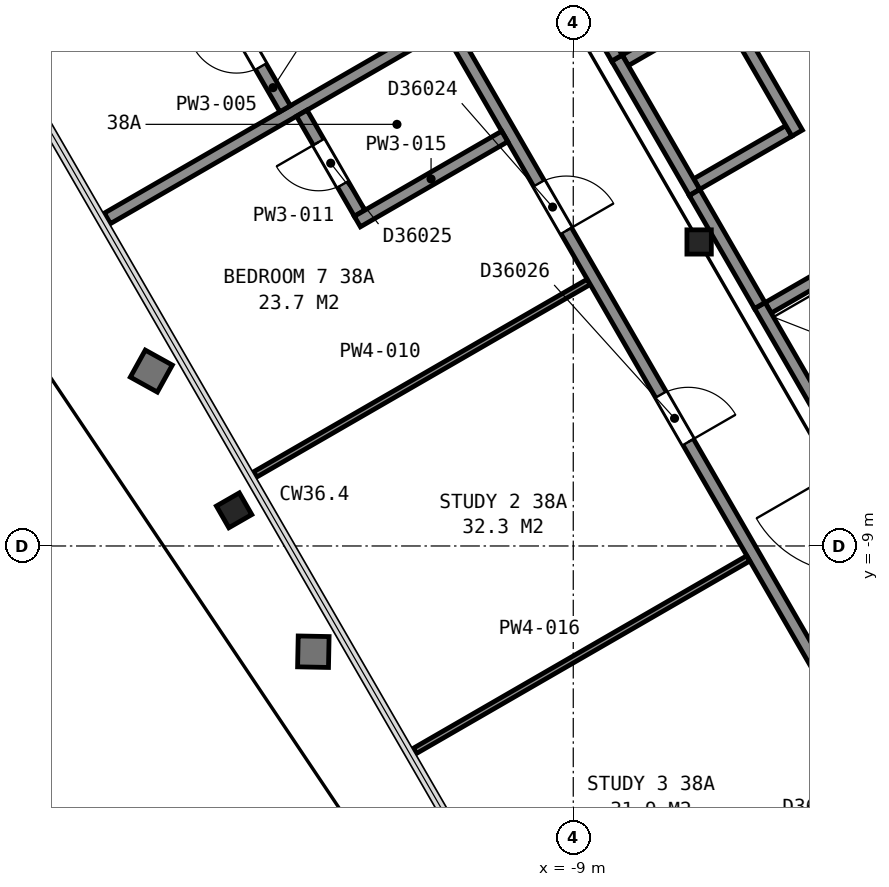
"""IFC4 building model, lengths in metres.
Left out: names, types, materials, properties, quantities, classifications, styles, units other than length and angle.
Written with IfcOpenShell. Run it as: python <this file> out.ifc"""

import sys

from ifc_helpers import new_model, si_unit, direction, frame, frame_2d, origin, origin_2d, place, context, subcontext, project, spatial, rectangle, i_section, extrude, element, fill, save


model = new_model("IFC4")
c1 = context("Model", 3, precision=1e-05, world=origin(), true_north=direction((0.0, 1.0)))
c2 = subcontext(c1, "Body", "Model", "MODEL_VIEW")
j1 = project(units=[si_unit("LENGTHUNIT", "METRE"), si_unit("PLANEANGLEUNIT", "RADIAN")], contexts=[c1])
p1 = place(None, origin())
s1 = spatial("IfcSite", under=j1, at=p1, CompositionType="ELEMENT")
p2 = place(p1, origin())
s2 = spatial("IfcBuilding", under=s1, at=p2, CompositionType="ELEMENT")
p3 = place(p2, frame((0.0, 0.0, 156.2)))
s3 = spatial("IfcBuildingStorey", under=s2, at=p3, CompositionType="ELEMENT", Elevation=156.2)
p4 = place(p3, frame((-14.386, -8.303, 0.035), z_axis=(-0.161950913523, -0.092968149868, 0.982409703087), x_axis=(-0.500182531239, 0.865919842872, -0.000511041508)))
e1 = element("IfcColumn", 1, at=p4, inside=s3, PredefinedType="COLUMN", context=c2, shape_type="SweptSolid", body=[
    extrude(i_section(OverallWidth=0.411, OverallDepth=0.434, WebThickness=0.036, FlangeThickness=0.057, FilletRadius=0.015, at=origin_2d()), origin(), (0.0, 0.0, 1.0), 3.695),
])
p5 = place(p3, frame((-6.93, -4.0, 0.0), z_axis=(0.0, 0.0, 1.0), x_axis=(1.0, 0.0, 0.0)))
e2 = element("IfcColumn", 2, at=p5, inside=s3, PredefinedType="COLUMN", context=c2, shape_type="SweptSolid", body=[
    extrude(i_section(OverallWidth=0.401, OverallDepth=0.399, WebThickness=0.025, FlangeThickness=0.04, FilletRadius=0.015, at=origin_2d()), origin(), (0.0, 0.0, 1.0), 3.7),
])
for number, where, z_axis, x_axis in (
    (3, (-5.795, -5.083, 0.0), (0.0, 0.0, 1.0), (0.866, 0.5, 0.0)),
    (4, (-6.97, -3.048, 0.0), (0.0, 0.0, 1.0), (0.866, 0.5, 0.0)),
):
    element("IfcWall", number, at=place(p3, frame(where, z_axis=z_axis, x_axis=x_axis)), inside=s3, PredefinedType="PARTITIONING", context=c2, shape_type="SweptSolid", body=[
        extrude(rectangle(XDim=1.75, YDim=0.2, at=frame_2d((0.875, 0.0))), origin(), (0.0, 0.0, 1.0), 3.7),
    ])
p6 = place(p3, frame((-8.145, -1.013, 0.0), z_axis=(0.0, 0.0, 1.0), x_axis=(0.866016494683, 0.500015430699, 0.0)))
e5 = element("IfcWall", 5, at=p6, inside=s3, PredefinedType="PARTITIONING", context=c2, shape_type="SweptSolid", body=[
    extrude(rectangle(XDim=3.15, YDim=0.2, at=frame_2d((1.575, 0.0))), origin(), (0.0, 0.0, 1.0), 3.7),
])
p7 = place(p3, frame((-5.318, -2.21, 0.0), z_axis=(0.0, 0.0, 1.0), x_axis=(-0.499938297808, 0.866061024631, 0.0)))
e6 = element("IfcWall", 6, at=p7, inside=s3, PredefinedType="PARTITIONING", context=c2, shape_type="SweptSolid", body=[
    extrude(rectangle(XDim=2.35, YDim=0.2, at=frame_2d((1.175, 0.0))), origin(), (0.0, 0.0, 1.0), 3.7),
])
for number, where, z_axis, x_axis in (
    (7, (-4.656, -7.255, 0.0), (0.0, 0.0, 1.0), (-0.5, 0.866, 0.0)),
    (8, (-7.006, -3.185, 0.0), (0.0, 0.0, 1.0), (-0.5, 0.866, 0.0)),
):
    element("IfcWall", number, at=place(p3, frame(where, z_axis=z_axis, x_axis=x_axis)), inside=s3, PredefinedType="PARTITIONING", context=c2, shape_type="SweptSolid", body=[
        extrude(rectangle(XDim=2.55, YDim=0.2, at=frame_2d((1.275, 0.0))), origin(), (0.0, 0.0, 1.0), 3.7),
    ])
p8 = place(p3, frame((-11.591, 4.755, 0.0), z_axis=(0.0, 0.0, 1.0), x_axis=(0.500043977787, -0.866000011708, 0.0)))
e9 = element("IfcWall", 9, at=p8, inside=s3, PredefinedType="PARTITIONING", context=c2, shape_type="SweptSolid", body=[
    extrude(rectangle(XDim=6.617, YDim=0.2, at=frame_2d((3.308, 0.0))), origin(), (0.0, 0.0, 1.0), 3.45),
])
p9 = place(p8, frame((3.695, 0.0, 0.0)))
e10 = element("IfcOpeningElement", 10, at=p9, cuts=e9, PredefinedType="OPENING", context=c2, shape_type="SweptSolid", body=[
    extrude(rectangle(XDim=1.8, YDim=2.1, at=frame_2d((0.9, 1.05))), frame((0.0, 0.11, 0.0), z_axis=(0.0, -1.0, 0.0), x_axis=(1.0, 0.0, 0.0)), (0.0, 0.0, 1.0), 0.22),
])
p10 = place(p3, frame((-7.005, -3.187, 0.0), z_axis=(0.0, 0.0, 1.0), x_axis=(0.499689606989, -0.866204535123, 0.0)))
e11 = element("IfcWall", 11, at=p10, inside=s3, PredefinedType="PARTITIONING", context=c2, shape_type="SweptSolid", body=[
    extrude(rectangle(XDim=2.145, YDim=0.2, at=frame_2d((1.072, 0.0))), origin(), (0.0, 0.0, 1.0), 3.45),
])
p11 = place(p3, frame((-16.662, -3.612, 0.0), z_axis=(0.0, 0.0, 1.0), x_axis=(0.866030886774, 0.499990503064, 0.0)))
e12 = element("IfcWall", 12, at=p11, inside=s3, PredefinedType="PARTITIONING", context=c2, shape_type="SweptSolid", body=[
    extrude(rectangle(XDim=6.333, YDim=0.2, at=frame_2d((3.167, 0.0))), origin(), (0.0, 0.0, 1.0), 2.713),
])
p12 = place(p3, frame((-14.938, 0.271, 0.0), z_axis=(0.0, 0.0, 1.0), x_axis=(0.499913221443, -0.866075499611, 0.0)))
e13 = element("IfcWall", 13, at=p12, inside=s3, PredefinedType="PARTITIONING", context=c2, shape_type="SweptSolid", body=[
    extrude(rectangle(XDim=2.4, YDim=0.2, at=frame_2d((1.2, 0.0))), origin(), (0.0, 0.0, 1.0), 2.713),
])
p13 = place(p12, frame((0.8, 0.0, 0.0)))
e14 = element("IfcOpeningElement", 14, at=p13, cuts=e13, PredefinedType="OPENING", context=c2, shape_type="SweptSolid", body=[
    extrude(rectangle(XDim=0.8, YDim=2.1, at=frame_2d((0.4, 1.05))), frame((0.0, 0.11, 0.0), z_axis=(0.0, -1.0, 0.0), x_axis=(1.0, 0.0, 0.0)), (0.0, 0.0, 1.0), 0.22),
])
p14 = place(p3, frame((-14.23, -7.823, 0.0), z_axis=(0.0, 0.0, 1.0), x_axis=(0.866021249958, 0.50000719457, 0.0)))
e15 = element("IfcWall", 15, at=p14, inside=s3, PredefinedType="PARTITIONING", context=c2, shape_type="SweptSolid", body=[
    extrude(rectangle(XDim=6.333, YDim=0.1, at=frame_2d((3.167, 0.0))), origin(), (0.0, 0.0, 1.0), 2.713),
])
p15 = place(p3, frame((-13.464, -1.882, 0.0), z_axis=(0.0, 0.0, 1.0), x_axis=(0.500007885066, -0.866020851292, 0.0)))
e16 = element("IfcWall", 16, at=p15, inside=s3, PredefinedType="PARTITIONING", context=c2, shape_type="SweptSolid", body=[
    extrude(rectangle(XDim=1.9, YDim=0.2, at=frame_2d((0.95, 0.0))), origin(), (0.0, 0.0, 1.0), 2.713),
])
p16 = place(p15, frame((0.55, 0.0, 0.0)))
e17 = element("IfcOpeningElement", 17, at=p16, cuts=e16, PredefinedType="OPENING", context=c2, shape_type="SweptSolid", body=[
    extrude(rectangle(XDim=0.8, YDim=2.1, at=frame_2d((0.4, 1.05))), frame((0.0, 0.11, 0.0), z_axis=(0.0, -1.0, 0.0), x_axis=(1.0, 0.0, 0.0)), (0.0, 0.0, 1.0), 0.22),
])
p17 = place(p3, frame((-4.075, -12.545, 0.0), z_axis=(0.0, 0.0, 1.0), x_axis=(-0.499999743747, 0.866025551732, 0.0)))
e18 = element("IfcWall", 18, at=p17, inside=s3, PredefinedType="PARTITIONING", context=c2, shape_type="SweptSolid", body=[
    extrude(rectangle(XDim=17.656, YDim=0.2, at=frame_2d((8.828, 0.0))), origin(), (0.0, 0.0, 1.0), 2.713),
])
p18 = place(p17, frame((10.08, 0.0, 0.0)))
e19 = element("IfcOpeningElement", 19, at=p18, cuts=e18, PredefinedType="OPENING", context=c2, shape_type="SweptSolid", body=[
    extrude(rectangle(XDim=0.9, YDim=2.1, at=frame_2d((0.45, 1.05))), frame((0.0, 0.11, 0.0), z_axis=(0.0, -1.0, 0.0), x_axis=(1.0, 0.0, 0.0)), (0.0, 0.0, 1.0), 0.22),
])
p19 = place(p17, frame((6.068, 0.0, 0.0)))
e20 = element("IfcOpeningElement", 20, at=p19, cuts=e18, PredefinedType="OPENING", context=c2, shape_type="SweptSolid", body=[
    extrude(rectangle(XDim=0.9, YDim=2.1, at=frame_2d((0.45, 1.05))), frame((0.0, 0.11, 0.0), z_axis=(0.0, -1.0, 0.0), x_axis=(1.0, 0.0, 0.0)), (0.0, 0.0, 1.0), 0.22),
])
p20 = place(p3, frame((-12.551, -3.664, 0.0), z_axis=(0.0, 0.0, 1.0), x_axis=(0.865909567298, 0.500200581029, 0.0)))
e21 = element("IfcWall", 21, at=p20, inside=s3, PredefinedType="PARTITIONING", context=c2, shape_type="SweptSolid", body=[
    extrude(rectangle(XDim=2.799, YDim=0.2, at=frame_2d((1.399, 0.0))), origin(), (0.0, 0.0, 1.0), 2.713),
])
p21 = place(p3, frame((-11.605, -12.37, 0.0), z_axis=(0.0, 0.0, 1.0), x_axis=(0.866017278078, 0.500014073873, 0.0)))
e22 = element("IfcWall", 22, at=p21, inside=s3, PredefinedType="PARTITIONING", context=c2, shape_type="SweptSolid", body=[
    extrude(rectangle(XDim=6.329, YDim=0.1, at=frame_2d((3.165, 0.0))), origin(), (0.0, 0.0, 1.0), 2.713),
])
p22 = place(p13, origin())
e23 = element("IfcDoor", 23, at=p22, inside=s3, OperationType="SINGLE_SWING_LEFT", PredefinedType="DOOR", context=c2, shape_type="SweptSolid", body=[
    extrude(rectangle(XDim=0.8, YDim=2.1, at=frame_2d((0.4, 1.05))), frame((0.0, 0.025, 0.0), z_axis=(0.0, -1.0, 0.0), x_axis=(1.0, 0.0, 0.0)), (0.0, 0.0, 1.0), 0.05),
])
fill(e14, e23)
p23 = place(p16, origin())
e24 = element("IfcDoor", 24, at=p23, inside=s3, OperationType="SINGLE_SWING_LEFT", PredefinedType="DOOR", context=c2, shape_type="SweptSolid", body=[
    extrude(rectangle(XDim=0.8, YDim=2.1, at=frame_2d((0.4, 1.05))), frame((0.0, 0.025, 0.0), z_axis=(0.0, -1.0, 0.0), x_axis=(1.0, 0.0, 0.0)), (0.0, 0.0, 1.0), 0.05),
])
fill(e17, e24)
p24 = place(p18, origin())
e25 = element("IfcDoor", 25, at=p24, inside=s3, OperationType="SINGLE_SWING_LEFT", PredefinedType="DOOR", context=c2, shape_type="SweptSolid", body=[
    extrude(rectangle(XDim=0.9, YDim=2.1, at=frame_2d((0.45, 1.05))), frame((0.0, 0.025, 0.0), z_axis=(0.0, -1.0, 0.0), x_axis=(1.0, 0.0, 0.0)), (0.0, 0.0, 1.0), 0.05),
])
fill(e19, e25)
p25 = place(p19, origin())
e26 = element("IfcDoor", 26, at=p25, inside=s3, OperationType="SINGLE_SWING_LEFT", PredefinedType="DOOR", context=c2, shape_type="SweptSolid", body=[
    extrude(rectangle(XDim=0.9, YDim=2.1, at=frame_2d((0.45, 1.05))), frame((0.0, 0.025, 0.0), z_axis=(0.0, -1.0, 0.0), x_axis=(1.0, 0.0, 0.0)), (0.0, 0.0, 1.0), 0.05),
])
fill(e20, e26)
save(model, sys.argv[1])
